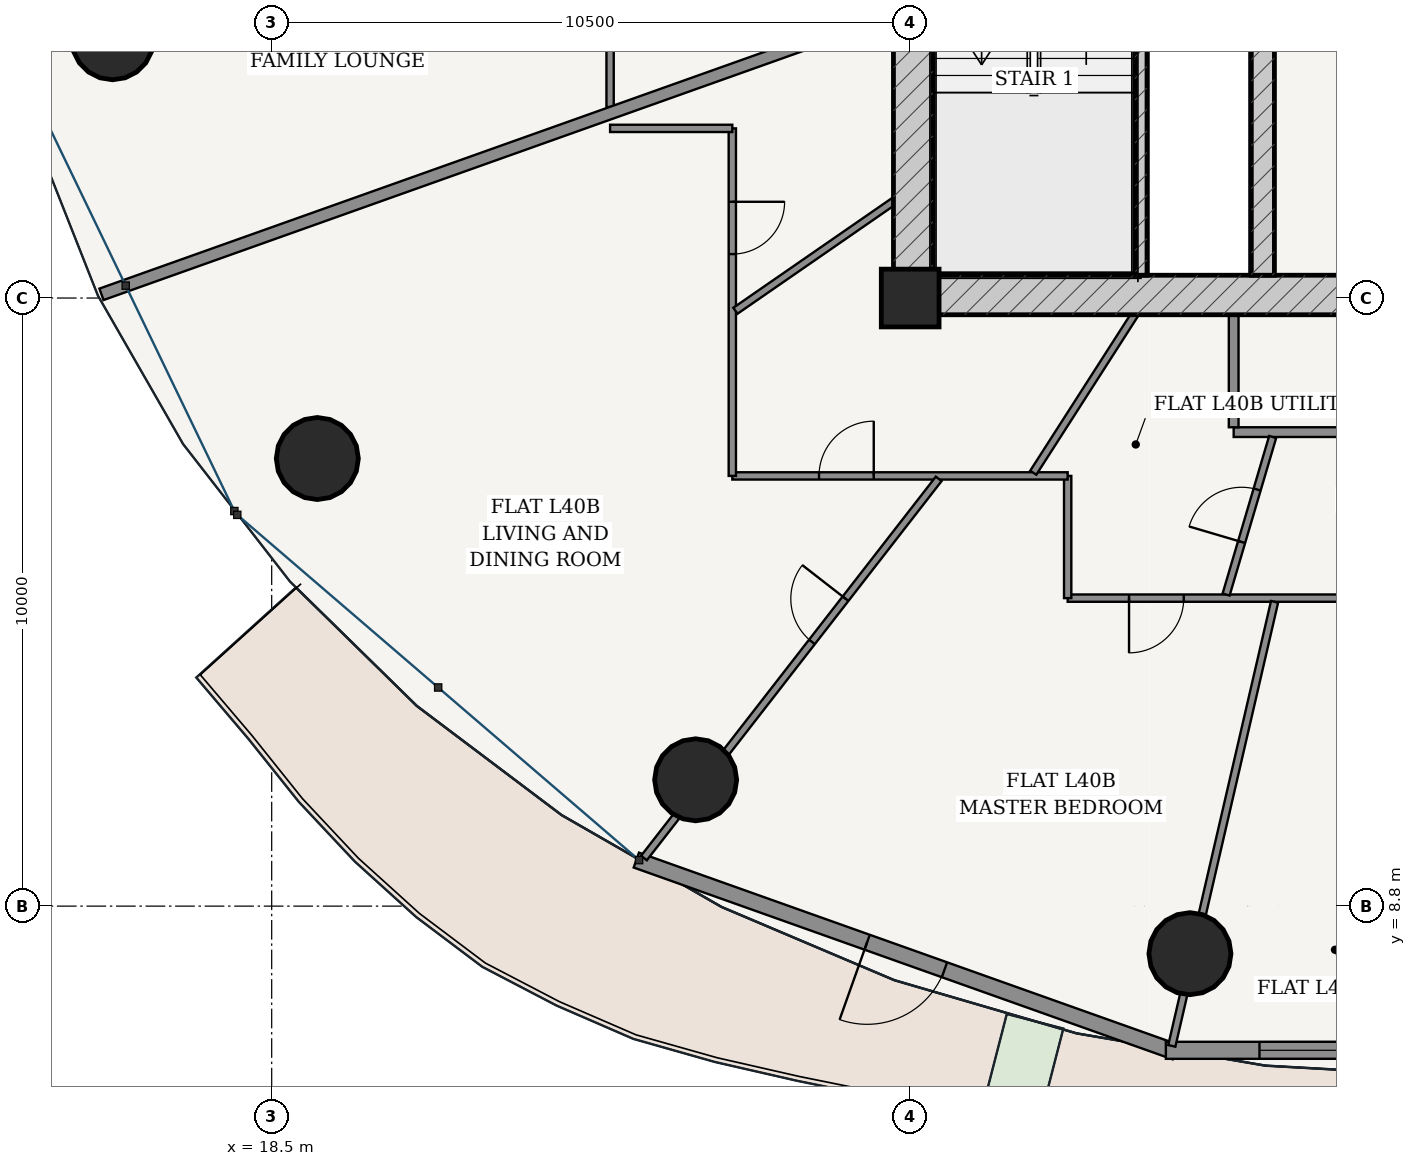
"""IFC4 building model, lengths in metres.
Left out: names, types, materials, properties, quantities, classifications, styles, units other than length and angle.
Written with IfcOpenShell. Run it as: python <this file> out.ifc"""

import sys

from ifc_helpers import new_model, si_unit, direction, frame, frame_2d, origin, origin_2d, place, context, subcontext, project, spatial, rectangle, hollow_circle, extrude, source, transform, mapped, element, fill, save


model = new_model("IFC4")
c1 = context("Model", 3, precision=1e-05, world=origin(), true_north=direction((-0.2419218956, 0.970295726276)))
c2 = subcontext(c1, "Body", "Model", "MODEL_VIEW")
j1 = project(units=[si_unit("LENGTHUNIT", "METRE"), si_unit("PLANEANGLEUNIT", "RADIAN")], contexts=[c1])
p1 = place(None, origin())
s1 = spatial("IfcSite", under=j1, at=p1, CompositionType="ELEMENT")
p2 = place(p1, origin())
s2 = spatial("IfcBuilding", under=s1, at=p2, CompositionType="ELEMENT")
p3 = place(p2, frame((0.0, 0.0, 153.4)))
s3 = spatial("IfcBuildingStorey", under=s2, at=p3, CompositionType="ELEMENT", Elevation=153.4)
p4 = place(p3, frame((29.0, 18.8, 0.0), z_axis=(0.0, 0.0, 1.0), x_axis=(1.0, 0.0, 0.0)))
e1 = element("IfcColumn", 1, at=p4, inside=s3, PredefinedType="COLUMN", context=c2, shape_type="SweptSolid", body=[
    extrude(rectangle(XDim=0.95, YDim=0.95, at=origin_2d()), origin(), (0.0, 0.0, 1.0), 3.6),
])
p5 = place(p3, frame((28.725, 18.85, 0.0), z_axis=(0.0, 0.0, 1.0), x_axis=(1.0, 0.0, 0.0)))
e2 = element("IfcWall", 2, at=p5, inside=s3, PredefinedType="SHEAR", context=c2, shape_type="SweptSolid", body=[
    extrude(rectangle(XDim=18.55, YDim=0.65, at=frame_2d((9.275, 0.0))), origin(), (0.0, 0.0, 1.0), 3.33),
])
p6 = place(p5, frame((7.51, 0.0, 0.0)))
e3 = element("IfcOpeningElement", 3, at=p6, cuts=e2, PredefinedType="OPENING", context=c2, shape_type="SweptSolid", body=[
    extrude(rectangle(XDim=0.85, YDim=2.1, at=frame_2d((0.425, 1.05))), frame((0.0, 0.335, 0.0), z_axis=(0.0, -1.0, 0.0), x_axis=(1.0, 0.0, 0.0)), (0.0, 0.0, 1.0), 0.67),
])
p7 = place(p5, frame((10.59, 0.0, 0.0)))
e4 = element("IfcOpeningElement", 4, at=p7, cuts=e2, PredefinedType="OPENING", context=c2, shape_type="SweptSolid", body=[
    extrude(rectangle(XDim=0.85, YDim=2.1, at=frame_2d((0.425, 1.05))), frame((0.0, 0.335, 0.0), z_axis=(0.0, -1.0, 0.0), x_axis=(1.0, 0.0, 0.0)), (0.0, 0.0, 1.0), 0.67),
])
p8 = place(p3, frame((29.05, 19.175, 0.0), z_axis=(0.0, 0.0, 1.0), x_axis=(0.0, 1.0, 0.0)))
e5 = element("IfcWall", 5, at=p8, inside=s3, PredefinedType="SHEAR", context=c2, shape_type="SweptSolid", body=[
    extrude(rectangle(XDim=15.25, YDim=0.65, at=frame_2d((7.625, 0.0))), origin(), (0.0, 0.0, 1.0), 3.33),
])
p9 = place(p8, frame((9.875, 0.0, 0.0)))
e6 = element("IfcOpeningElement", 6, at=p9, cuts=e5, PredefinedType="OPENING", context=c2, shape_type="SweptSolid", body=[
    extrude(rectangle(XDim=1.5, YDim=2.2, at=frame_2d((0.75, 1.1))), frame((0.0, 0.335, 0.0), z_axis=(0.0, -1.0, 0.0), x_axis=(1.0, 0.0, 0.0)), (0.0, 0.0, 1.0), 0.67),
])
p10 = place(p3, frame((32.795, 19.175, 0.0), z_axis=(0.0, 0.0, 1.0), x_axis=(0.0, 1.0, 0.0)))
e7 = element("IfcWall", 7, at=p10, inside=s3, PredefinedType="SOLIDWALL", context=c2, shape_type="SweptSolid", body=[
    extrude(rectangle(XDim=7.375, YDim=0.2, at=frame_2d((3.688, 0.0))), origin(), (0.0, 0.0, 1.0), 3.33),
])
p11 = place(p3, frame((34.8, 19.175, 0.0), z_axis=(0.0, 0.0, 1.0), x_axis=(0.0, 1.0, 0.0)))
e8 = element("IfcWall", 8, at=p11, inside=s3, PredefinedType="SHEAR", context=c2, shape_type="SweptSolid", body=[
    extrude(rectangle(XDim=15.25, YDim=0.38, at=frame_2d((7.625, 0.0))), origin(), (0.0, 0.0, 1.0), 3.33),
])
p12 = place(p11, frame((7.8, 0.0, 0.0)))
e9 = element("IfcOpeningElement", 9, at=p12, cuts=e8, PredefinedType="OPENING", context=c2, shape_type="SweptSolid", body=[
    extrude(rectangle(XDim=1.05, YDim=2.15, at=frame_2d((0.525, 1.075))), frame((0.0, 0.2, 0.0), z_axis=(0.0, -1.0, 0.0), x_axis=(1.0, 0.0, 0.0)), (0.0, 0.0, 1.0), 0.4),
])
for number, where, z_axis, x_axis in (
    (10, (15.883, 23.064, 0.0), (0.0, 0.0, 1.0), (1.0, 0.0, 0.0)),
    (11, (19.25, 16.161, 0.0), (0.0, 0.0, 1.0), (1.0, 0.0, 0.0)),
    (12, (25.472, 10.877, 0.0), (0.0, 0.0, 1.0), (1.0, 0.0, 0.0)),
    (13, (33.601, 8.018, 0.0), (0.0, 0.0, 1.0), (1.0, 0.0, 0.0)),
):
    element("IfcColumn", number, at=place(p3, frame(where, z_axis=z_axis, x_axis=x_axis)), inside=s3, PredefinedType="COLUMN", context=c2, shape_type="SweptSolid", body=[
        extrude(hollow_circle(Radius=0.675, WallThickness=0.042, at=origin_2d()), origin(), (0.0, 0.0, 1.0), 3.6),
    ])
p13 = place(p3, frame((24.497, 9.557, 0.0), z_axis=(0.0, 0.0, 1.0), x_axis=(0.942103604331, -0.335321932934, 0.0)))
e14 = element("IfcWall", 14, at=p13, inside=s3, PredefinedType="SOLIDWALL", context=c2, shape_type="SweptSolid", body=[
    extrude(rectangle(XDim=9.408, YDim=0.26, at=frame_2d((4.704, 0.0))), origin(), (0.0, 0.0, 1.0), 3.33),
])
p14 = place(p13, frame((4.029, 0.0, 0.0)))
e15 = element("IfcOpeningElement", 15, at=p14, cuts=e14, PredefinedType="OPENING", context=c2, shape_type="SweptSolid", body=[
    extrude(rectangle(XDim=1.35, YDim=2.2, at=frame_2d((0.675, 1.1))), frame((0.0, 0.14, 0.0), z_axis=(0.0, -1.0, 0.0), x_axis=(1.0, 0.0, 0.0)), (0.0, 0.0, 1.0), 0.28),
])
p15 = place(p3, frame((33.205, 6.429, 0.0), z_axis=(0.0, 0.0, 1.0), x_axis=(1.0, 0.0, 0.0)))
e16 = element("IfcWall", 16, at=p15, inside=s3, PredefinedType="SOLIDWALL", context=c2, shape_type="SweptSolid", body=[
    extrude(rectangle(XDim=9.591, YDim=0.28, at=frame_2d((4.795, 0.0))), origin(), (0.0, 0.0, 1.0), 3.33),
])
p16 = place(p15, frame((1.54, 0.0, 0.85)))
e17 = element("IfcOpeningElement", 17, at=p16, cuts=e16, PredefinedType="OPENING", context=c2, shape_type="SweptSolid", body=[
    extrude(rectangle(XDim=2.1, YDim=1.95, at=frame_2d((1.05, 0.975))), frame((0.0, 0.15, 0.0), z_axis=(0.0, -1.0, 0.0), x_axis=(1.0, 0.0, 0.0)), (0.0, 0.0, 1.0), 0.3),
])
p17 = place(p15, frame((5.951, 0.0, 0.85)))
e18 = element("IfcOpeningElement", 18, at=p17, cuts=e16, PredefinedType="OPENING", context=c2, shape_type="SweptSolid", body=[
    extrude(rectangle(XDim=2.1, YDim=1.95, at=frame_2d((1.05, 0.975))), frame((0.0, 0.15, 0.0), z_axis=(0.0, -1.0, 0.0), x_axis=(1.0, 0.0, 0.0)), (0.0, 0.0, 1.0), 0.3),
])
p18 = place(p3, frame((34.32, 16.595, 0.0), z_axis=(0.0, 0.0, 1.0), x_axis=(1.0, 0.0, 0.0)))
e19 = element("IfcWall", 19, at=p18, inside=s3, PredefinedType="PARTITIONING", context=c2, shape_type="SweptSolid", body=[
    extrude(rectangle(XDim=14.885, YDim=0.16, at=frame_2d((7.442, 0.0))), origin(), (0.0, 0.0, 1.0), 2.776),
])
p19 = place(p18, frame((11.609, 0.0, 0.0)))
e20 = element("IfcOpeningElement", 20, at=p19, cuts=e19, PredefinedType="OPENING", context=c2, shape_type="SweptSolid", body=[
    extrude(rectangle(XDim=0.98, YDim=2.2, at=frame_2d((0.49, 1.1))), frame((0.0, 0.09, 0.0), z_axis=(0.0, -1.0, 0.0), x_axis=(1.0, 0.0, 0.0)), (0.0, 0.0, 1.0), 0.18),
])
p20 = place(p3, frame((34.32, 16.675, 0.0), z_axis=(0.0, 0.0, 1.0), x_axis=(0.0, 1.0, 0.0)))
e21 = element("IfcWall", 21, at=p20, inside=s3, PredefinedType="PARTITIONING", context=c2, shape_type="SweptSolid", body=[
    extrude(rectangle(XDim=1.85, YDim=0.16, at=frame_2d((0.925, 0.0))), origin(), (0.0, 0.0, 1.0), 3.33),
])
p21 = place(p3, frame((24.065, 21.941, 0.0), z_axis=(0.0, 0.0, 1.0), x_axis=(0.0, 1.0, 0.0)))
e22 = element("IfcWall", 22, at=p21, inside=s3, PredefinedType="PARTITIONING", context=c2, shape_type="SweptSolid", body=[
    extrude(rectangle(XDim=15.944, YDim=0.12, at=frame_2d((7.972, 0.0))), origin(), (0.0, 0.0, 1.0), 2.776),
])
p22 = place(p21, frame((5.602, 0.0, 0.0)))
e23 = element("IfcOpeningElement", 23, at=p22, cuts=e22, PredefinedType="OPENING", context=c2, shape_type="SweptSolid", body=[
    extrude(rectangle(XDim=0.9, YDim=2.15, at=frame_2d((0.45, 1.075))), frame((0.0, 0.07, 0.0), z_axis=(0.0, -1.0, 0.0), x_axis=(1.0, 0.0, 0.0)), (0.0, 0.0, 1.0), 0.14),
])
p23 = place(p21, frame((1.707, 0.0, 0.0)))
e24 = element("IfcOpeningElement", 24, at=p23, cuts=e22, PredefinedType="OPENING", context=c2, shape_type="SweptSolid", body=[
    extrude(rectangle(XDim=0.9, YDim=2.15, at=frame_2d((0.45, 1.075))), frame((0.0, 0.07, 0.0), z_axis=(0.0, -1.0, 0.0), x_axis=(1.0, 0.0, 0.0)), (0.0, 0.0, 1.0), 0.14),
])
p24 = place(p21, frame((11.402, 0.0, 0.0)))
e25 = element("IfcOpeningElement", 25, at=p24, cuts=e22, PredefinedType="OPENING", context=c2, shape_type="SweptSolid", body=[
    extrude(rectangle(XDim=0.9, YDim=2.15, at=frame_2d((0.45, 1.075))), frame((0.0, 0.07, 0.0), z_axis=(0.0, -1.0, 0.0), x_axis=(1.0, 0.0, 0.0)), (0.0, 0.0, 1.0), 0.14),
])
p25 = place(p3, frame((28.723, 23.497, 0.0), z_axis=(0.0, 0.0, 1.0), x_axis=(-0.942077095572, -0.335396401292, 0.0)))
e26 = element("IfcWall", 26, at=p25, inside=s3, PredefinedType="PARTITIONING", context=c2, shape_type="SweptSolid", body=[
    extrude(rectangle(XDim=13.823, YDim=0.2, at=frame_2d((6.912, 0.0))), origin(), (0.0, 0.0, 1.0), 2.846),
])
p26 = place(p3, frame((51.935, 13.865, 0.0), z_axis=(0.0, 0.0, 1.0), x_axis=(-1.0, 0.0, 0.0)))
e27 = element("IfcWall", 27, at=p26, inside=s3, PredefinedType="PARTITIONING", context=c2, shape_type="SweptSolid", body=[
    extrude(rectangle(XDim=20.345, YDim=0.12, at=frame_2d((10.172, 0.0))), origin(), (0.0, 0.0, 1.0), 2.776),
])
p27 = place(p26, frame((2.985, 0.0, 0.0)))
e28 = element("IfcOpeningElement", 28, at=p27, cuts=e27, PredefinedType="OPENING", context=c2, shape_type="SweptSolid", body=[
    extrude(rectangle(XDim=0.9, YDim=2.15, at=frame_2d((0.45, 1.075))), frame((0.0, 0.07, 0.0), z_axis=(0.0, -1.0, 0.0), x_axis=(1.0, 0.0, 0.0)), (0.0, 0.0, 1.0), 0.14),
])
p28 = place(p26, frame((12.333, 0.0, 0.0)))
e29 = element("IfcOpeningElement", 29, at=p28, cuts=e27, PredefinedType="OPENING", context=c2, shape_type="SweptSolid", body=[
    extrude(rectangle(XDim=0.9, YDim=2.15, at=frame_2d((0.45, 1.075))), frame((0.0, 0.07, 0.0), z_axis=(0.0, -1.0, 0.0), x_axis=(1.0, 0.0, 0.0)), (0.0, 0.0, 1.0), 0.14),
])
p29 = place(p26, frame((18.436, 0.0, 0.0)))
e30 = element("IfcOpeningElement", 30, at=p29, cuts=e27, PredefinedType="OPENING", context=c2, shape_type="SweptSolid", body=[
    extrude(rectangle(XDim=0.9, YDim=2.15, at=frame_2d((0.45, 1.075))), frame((0.0, 0.07, 0.0), z_axis=(0.0, -1.0, 0.0), x_axis=(1.0, 0.0, 0.0)), (0.0, 0.0, 1.0), 0.14),
])
p30 = place(p3, frame((31.59, 13.865, 0.0), z_axis=(0.0, 0.0, 1.0), x_axis=(0.0, 1.0, 0.0)))
e31 = element("IfcWall", 31, at=p30, inside=s3, PredefinedType="PARTITIONING", context=c2, shape_type="SweptSolid", body=[
    extrude(rectangle(XDim=2.01, YDim=0.12, at=frame_2d((1.005, 0.0))), origin(), (0.0, 0.0, 1.0), 3.005),
])
p31 = place(p3, frame((31.59, 15.875, 0.0), z_axis=(0.0, 0.0, 1.0), x_axis=(-1.0, 0.0, 0.0)))
e32 = element("IfcWall", 32, at=p31, inside=s3, PredefinedType="PARTITIONING", context=c2, shape_type="SweptSolid", body=[
    extrude(rectangle(XDim=5.515, YDim=0.12, at=frame_2d((2.758, 0.0))), origin(), (0.0, 0.0, 1.0), 2.776),
])
p32 = place(p31, frame((3.189, 0.0, 0.0)))
e33 = element("IfcOpeningElement", 33, at=p32, cuts=e32, PredefinedType="OPENING", context=c2, shape_type="SweptSolid", body=[
    extrude(rectangle(XDim=0.9, YDim=2.15, at=frame_2d((0.45, 1.075))), frame((0.0, 0.07, 0.0), z_axis=(0.0, -1.0, 0.0), x_axis=(1.0, 0.0, 0.0)), (0.0, 0.0, 1.0), 0.14),
])
p33 = place(p3, frame((26.075, 15.875, 0.0), z_axis=(0.0, 0.0, 1.0), x_axis=(0.0, 1.0, 0.0)))
e34 = element("IfcWall", 34, at=p33, inside=s3, PredefinedType="PARTITIONING", context=c2, shape_type="SweptSolid", body=[
    extrude(rectangle(XDim=5.715, YDim=0.12, at=frame_2d((2.857, 0.0))), origin(), (0.0, 0.0, 1.0), 2.776),
])
p34 = place(p33, frame((3.648, 0.0, 0.0)))
e35 = element("IfcOpeningElement", 35, at=p34, cuts=e34, PredefinedType="OPENING", context=c2, shape_type="SweptSolid", body=[
    extrude(rectangle(XDim=0.86, YDim=2.15, at=frame_2d((0.43, 1.075))), frame((0.0, 0.07, 0.0), z_axis=(0.0, -1.0, 0.0), x_axis=(1.0, 0.0, 0.0)), (0.0, 0.0, 1.0), 0.14),
])
p35 = place(p3, frame((26.075, 21.59, 0.0), z_axis=(0.0, 0.0, 1.0), x_axis=(-1.0, 0.0, 0.0)))
e36 = element("IfcWall", 36, at=p35, inside=s3, PredefinedType="PARTITIONING", context=c2, shape_type="SweptSolid", body=[
    extrude(rectangle(XDim=2.01, YDim=0.12, at=frame_2d((1.005, 0.0))), origin(), (0.0, 0.0, 1.0), 3.33),
])
p36 = place(p3, frame((29.469, 15.826, 0.0), z_axis=(0.0, 0.0, 1.0), x_axis=(-0.61373942367, -0.789508657225, 0.0)))
e37 = element("IfcWall", 37, at=p36, inside=s3, PredefinedType="PARTITIONING", context=c2, shape_type="SweptSolid", body=[
    extrude(rectangle(XDim=7.898, YDim=0.12, at=frame_2d((3.949, 0.0))), origin(), (0.0, 0.0, 1.0), 2.776),
])
p37 = place(p36, frame((2.496, 0.0, 0.0)))
e38 = element("IfcOpeningElement", 38, at=p37, cuts=e37, PredefinedType="OPENING", context=c2, shape_type="SweptSolid", body=[
    extrude(rectangle(XDim=0.9, YDim=2.15, at=frame_2d((0.45, 1.075))), frame((0.0, 0.07, 0.0), z_axis=(0.0, -1.0, 0.0), x_axis=(1.0, 0.0, 0.0)), (0.0, 0.0, 1.0), 0.14),
])
p38 = place(p3, frame((34.992, 13.805, 0.0), z_axis=(0.0, 0.0, 1.0), x_axis=(-0.225447000045, -0.974255433739, 0.0)))
e39 = element("IfcWall", 39, at=p38, inside=s3, PredefinedType="PARTITIONING", context=c2, shape_type="SweptSolid", body=[
    extrude(rectangle(XDim=7.496, YDim=0.12, at=frame_2d((3.748, 0.0))), origin(), (0.0, 0.0, 1.0), 2.776),
])
p39 = place(p3, frame((28.723, 20.386, 0.0), z_axis=(0.0, 0.0, 1.0), x_axis=(-0.822570551556, -0.568663070467, 0.0)))
e40 = element("IfcWall", 40, at=p39, inside=s3, PredefinedType="PARTITIONING", context=c2, shape_type="SweptSolid", body=[
    extrude(rectangle(XDim=3.158, YDim=0.12, at=frame_2d((1.579, 0.0))), origin(), (0.0, 0.0, 1.0), 3.33),
])
p40 = place(p3, frame((32.691, 18.525, 0.0), z_axis=(0.0, 0.0, 1.0), x_axis=(-0.54002976428, -0.841645919429, 0.0)))
e41 = element("IfcWall", 41, at=p40, inside=s3, PredefinedType="PARTITIONING", context=c2, shape_type="SweptSolid", body=[
    extrude(rectangle(XDim=3.086, YDim=0.12, at=frame_2d((1.543, 0.0))), origin(), (0.0, 0.0, 1.0), 3.33),
])
p41 = place(p3, frame((34.961, 16.515, 0.0), z_axis=(0.0, 0.0, 1.0), x_axis=(-0.283365034326, -0.959012125743, 0.0)))
e42 = element("IfcWall", 42, at=p41, inside=s3, PredefinedType="PARTITIONING", context=c2, shape_type="SweptSolid", body=[
    extrude(rectangle(XDim=2.701, YDim=0.12, at=frame_2d((1.351, 0.0))), origin(), (0.0, 0.0, 1.0), 3.33),
])
p42 = place(p41, frame((0.901, 0.0, 0.0)))
e43 = element("IfcOpeningElement", 43, at=p42, cuts=e42, PredefinedType="OPENING", context=c2, shape_type="SweptSolid", body=[
    extrude(rectangle(XDim=0.9, YDim=2.15, at=frame_2d((0.45, 1.075))), frame((0.0, 0.07, 0.0), z_axis=(0.0, -1.0, 0.0), x_axis=(1.0, 0.0, 0.0)), (0.0, 0.0, 1.0), 0.14),
])
m1 = source(origin(), c2, "Body", "SweptSolid", [
    extrude(rectangle(XDim=1.35, YDim=2.2, at=frame_2d((0.675, 1.1))), frame((0.0, 0.025, 0.0), z_axis=(0.0, -1.0, 0.0), x_axis=(1.0, 0.0, 0.0)), (0.0, 0.0, 1.0), 0.05),
])
p43 = place(p14, frame((1.35, 0.0, 0.0), z_axis=(0.0, 0.0, 1.0), x_axis=(-1.0, 0.0, 0.0)))
e44 = element("IfcDoor", 44, at=p43, inside=s3, OperationType="SINGLE_SWING_RIGHT", PredefinedType="DOOR", context=c2, shape_type="MappedRepresentation", body=[
    mapped(m1, transform((0.0, 0.0, 0.0), scale=1.0)),
])
fill(e15, e44)
m2 = source(origin(), c2, "Body", "SweptSolid", [
    extrude(rectangle(XDim=2.1, YDim=1.95, at=frame_2d((1.05, 0.975))), frame((0.0, 0.03, 0.0), z_axis=(0.0, -1.0, 0.0), x_axis=(1.0, 0.0, 0.0)), (0.0, 0.0, 1.0), 0.06),
])
p44 = place(p16, origin())
e45 = element("IfcWindow", 45, at=p44, inside=s3, PartitioningType="SINGLE_PANEL", PredefinedType="WINDOW", context=c2, shape_type="MappedRepresentation", body=[
    mapped(m2, transform((0.0, 0.0, 0.0), scale=1.0)),
])
fill(e17, e45)
m3 = source(origin(), c2, "Body", "SweptSolid", [
    extrude(rectangle(XDim=0.9, YDim=2.15, at=frame_2d((0.45, 1.075))), frame((0.0, 0.025, 0.0), z_axis=(0.0, -1.0, 0.0), x_axis=(1.0, 0.0, 0.0)), (0.0, 0.0, 1.0), 0.05),
])
p45 = place(p42, frame((0.9, 0.0, 0.0), z_axis=(0.0, 0.0, 1.0), x_axis=(-1.0, 0.0, 0.0)))
e46 = element("IfcDoor", 46, at=p45, inside=s3, OperationType="SINGLE_SWING_LEFT", PredefinedType="DOOR", context=c2, shape_type="MappedRepresentation", body=[
    mapped(m3, transform((0.0, 0.0, 0.0), scale=1.0)),
])
fill(e43, e46)
p46 = place(p29, origin())
e47 = element("IfcDoor", 47, at=p46, inside=s3, OperationType="SINGLE_SWING_RIGHT", PredefinedType="DOOR", context=c2, shape_type="MappedRepresentation", body=[
    mapped(m3, transform((0.0, 0.0, 0.0), scale=1.0)),
])
fill(e30, e47)
p47 = place(p37, frame((0.9, 0.0, 0.0), z_axis=(0.0, 0.0, 1.0), x_axis=(-1.0, 0.0, 0.0)))
e48 = element("IfcDoor", 48, at=p47, inside=s3, OperationType="SINGLE_SWING_RIGHT", PredefinedType="DOOR", context=c2, shape_type="MappedRepresentation", body=[
    mapped(m3, transform((0.0, 0.0, 0.0), scale=1.0)),
])
fill(e38, e48)
m4 = source(origin(), c2, "Body", "SweptSolid", [
    extrude(rectangle(XDim=0.86, YDim=2.15, at=frame_2d((0.43, 1.075))), frame((0.0, 0.025, 0.0), z_axis=(0.0, -1.0, 0.0), x_axis=(1.0, 0.0, 0.0)), (0.0, 0.0, 1.0), 0.05),
])
p48 = place(p34, frame((0.86, 0.0, 0.0), z_axis=(0.0, 0.0, 1.0), x_axis=(-1.0, 0.0, 0.0)))
e49 = element("IfcDoor", 49, at=p48, inside=s3, OperationType="SINGLE_SWING_LEFT", PredefinedType="DOOR", context=c2, shape_type="MappedRepresentation", body=[
    mapped(m4, transform((0.0, 0.0, 0.0), scale=1.0)),
])
fill(e35, e49)
p49 = place(p32, frame((0.9, 0.0, 0.0), z_axis=(0.0, 0.0, 1.0), x_axis=(-1.0, 0.0, 0.0)))
e50 = element("IfcDoor", 50, at=p49, inside=s3, OperationType="SINGLE_SWING_RIGHT", PredefinedType="DOOR", context=c2, shape_type="MappedRepresentation", body=[
    mapped(m3, transform((0.0, 0.0, 0.0), scale=1.0)),
])
fill(e33, e50)
save(model, sys.argv[1])
